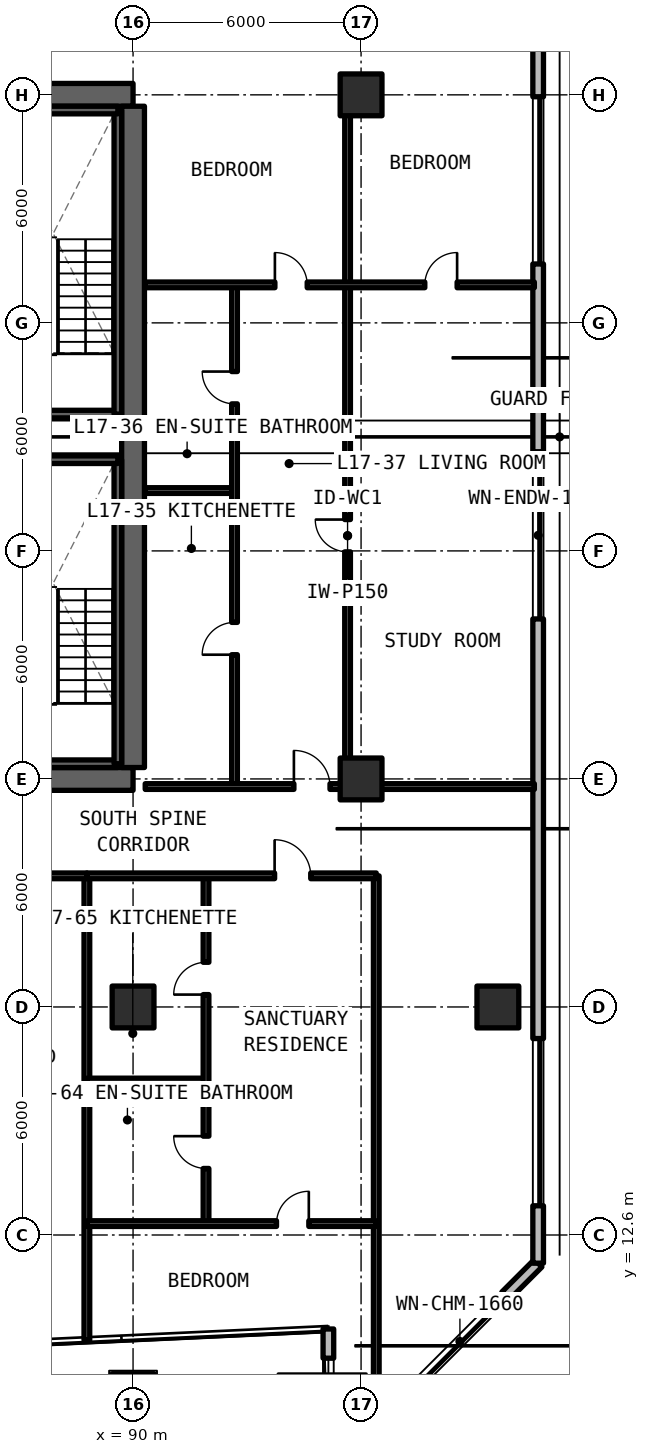
"""IFC4 building model, lengths in metres.
Left out: names, types, materials, properties, quantities, classifications, styles, units other than length and angle.
Written with IfcOpenShell. Run it as: python <this file> out.ifc"""

import sys

from ifc_helpers import new_model, si_unit, direction, frame, frame_2d, origin, origin_2d, place, context, subcontext, project, spatial, rectangle, extrude, element, fill, save


model = new_model("IFC4")
c1 = context("Model", 3, precision=1e-05, world=origin(), true_north=direction((0.0, 1.0)))
c2 = subcontext(c1, "Body", "Model", "MODEL_VIEW")
j1 = project(units=[si_unit("LENGTHUNIT", "METRE"), si_unit("PLANEANGLEUNIT", "RADIAN")], contexts=[c1])
p1 = place(None, origin())
s1 = spatial("IfcSite", under=j1, at=p1, CompositionType="ELEMENT")
p2 = place(p1, origin())
s2 = spatial("IfcBuilding", under=s1, at=p2, CompositionType="ELEMENT")
p3 = place(p2, frame((0.0, 0.0, 62.37)))
s3 = spatial("IfcBuildingStorey", under=s2, at=p3, CompositionType="ELEMENT", Elevation=62.37)
for number, where, z_axis, x_axis in (
    (1, (78.0, 24.6, 0.0), (0.0, 0.0, 1.0), (1.0, 0.0, 0.0)),
    (2, (90.0, 42.6, 0.0), (0.0, 0.0, 1.0), (-1.0, 0.0, 0.0)),
):
    element("IfcWall", number, at=place(p3, frame(where, z_axis=z_axis, x_axis=x_axis)), inside=s3, PredefinedType="SHEAR", context=c2, shape_type="SweptSolid", body=[
        extrude(rectangle(XDim=12.0, YDim=0.6, at=frame_2d((6.0, 0.0))), origin(), (0.0, 0.0, 1.0), 3.63),
    ])
p4 = place(p3, frame((90.0, 24.9, 0.0), z_axis=(0.0, 0.0, 1.0), x_axis=(0.0, 1.0, 0.0)))
e3 = element("IfcWall", 3, at=p4, inside=s3, PredefinedType="SHEAR", context=c2, shape_type="SweptSolid", body=[
    extrude(rectangle(XDim=17.4, YDim=0.6, at=frame_2d((8.7, 0.0))), origin(), (0.0, 0.0, 1.0), 3.63),
])
for number, where, z_axis, x_axis in (
    (4, (96.0, 24.6, 0.0), (0.0, 0.0, 1.0), (1.0, 0.0, 0.0)),
    (5, (96.0, 42.6, 0.0), (0.0, 0.0, 1.0), (1.0, 0.0, 0.0)),
    (6, (90.0, 18.6, 0.0), (0.0, 0.0, 1.0), (1.0, 0.0, 0.0)),
    (7, (99.6, 18.6, 0.0), (0.0, 0.0, 1.0), (1.0, 0.0, 0.0)),
    (8, (90.0, 8.4, 0.0), (0.0, 0.0, 1.0), (1.0, 0.0, 0.0)),
):
    element("IfcColumn", number, at=place(p3, frame(where, z_axis=z_axis, x_axis=x_axis)), inside=s3, PredefinedType="COLUMN", context=c2, shape_type="SweptSolid", body=[
        extrude(rectangle(XDim=1.1, YDim=1.1, at=origin_2d()), origin(), (0.0, 0.0, 1.0), 3.63),
    ])
p5 = place(p3, frame((95.14, 10.127, 0.0), z_axis=(0.0, 0.0, 1.0), x_axis=(0.0, -1.0, 0.0)))
e9 = element("IfcWall", 9, at=p5, inside=s3, PredefinedType="SOLIDWALL", context=c2, shape_type="SweptSolid", body=[
    extrude(rectangle(XDim=2.387, YDim=0.28, at=frame_2d((1.193, 0.0))), origin(), (0.0, 0.0, 1.0), 3.41),
])
p6 = place(p5, frame((0.768, 0.0, 0.78)))
e10 = element("IfcOpeningElement", 10, at=p6, cuts=e9, PredefinedType="OPENING", context=c2, shape_type="SweptSolid", body=[
    extrude(rectangle(XDim=0.85, YDim=1.65, at=frame_2d((0.425, 0.825))), frame((0.0, 0.15, 0.0), z_axis=(0.0, -1.0, 0.0), x_axis=(1.0, 0.0, 0.0)), (0.0, 0.0, 1.0), 0.3),
])
p7 = place(p3, frame((96.542, 7.74, 0.0), z_axis=(0.0, 0.0, 1.0), x_axis=(0.707106781187, 0.707106781187, 0.0)))
e11 = element("IfcWall", 11, at=p7, inside=s3, PredefinedType="SOLIDWALL", context=c2, shape_type="SweptSolid", body=[
    extrude(rectangle(XDim=5.824, YDim=0.28, at=frame_2d((2.912, 0.0))), origin(), (0.0, 0.0, 1.0), 3.41),
])
p8 = place(p7, frame((1.212, 0.0, 0.78)))
e12 = element("IfcOpeningElement", 12, at=p8, cuts=e11, PredefinedType="OPENING", context=c2, shape_type="SweptSolid", body=[
    extrude(rectangle(XDim=3.4, YDim=1.66, at=frame_2d((1.7, 0.83))), frame((0.0, 0.15, 0.0), z_axis=(0.0, -1.0, 0.0), x_axis=(1.0, 0.0, 0.0)), (0.0, 0.0, 1.0), 0.3),
])
p9 = place(p3, frame((100.66, 11.858, 0.0), z_axis=(0.0, 0.0, 1.0), x_axis=(0.0, 1.0, 0.0)))
e13 = element("IfcWall", 13, at=p9, inside=s3, PredefinedType="SOLIDWALL", context=c2, shape_type="SweptSolid", body=[
    extrude(rectangle(XDim=43.484, YDim=0.28, at=frame_2d((21.742, 0.0))), origin(), (0.0, 0.0, 1.0), 3.41),
])
p10 = place(p9, frame((16.952, 0.0, 0.78)))
e14 = element("IfcOpeningElement", 14, at=p10, cuts=e13, PredefinedType="OPENING", context=c2, shape_type="SweptSolid", body=[
    extrude(rectangle(XDim=4.4, YDim=1.66, at=frame_2d((2.2, 0.83))), frame((0.0, 0.15, 0.0), z_axis=(0.0, -1.0, 0.0), x_axis=(1.0, 0.0, 0.0)), (0.0, 0.0, 1.0), 0.3),
])
p11 = place(p9, frame((26.292, 0.0, 0.78)))
e15 = element("IfcOpeningElement", 15, at=p11, cuts=e13, PredefinedType="OPENING", context=c2, shape_type="SweptSolid", body=[
    extrude(rectangle(XDim=4.4, YDim=1.66, at=frame_2d((2.2, 0.83))), frame((0.0, 0.15, 0.0), z_axis=(0.0, -1.0, 0.0), x_axis=(1.0, 0.0, 0.0)), (0.0, 0.0, 1.0), 0.3),
])
p12 = place(p9, frame((1.511, 0.0, 0.78)))
e16 = element("IfcOpeningElement", 16, at=p12, cuts=e13, PredefinedType="OPENING", context=c2, shape_type="SweptSolid", body=[
    extrude(rectangle(XDim=4.4, YDim=1.66, at=frame_2d((2.2, 0.83))), frame((0.0, 0.15, 0.0), z_axis=(0.0, -1.0, 0.0), x_axis=(1.0, 0.0, 0.0)), (0.0, 0.0, 1.0), 0.3),
])
p13 = place(p3, frame((95.645, 24.4, 0.0), z_axis=(0.0, 0.0, 1.0), x_axis=(0.0, 1.0, 0.0)))
e17 = element("IfcWall", 17, at=p13, inside=s3, PredefinedType="PARTITIONING", context=c2, shape_type="SweptSolid", body=[
    extrude(rectangle(XDim=13.2, YDim=0.15, at=frame_2d((6.6, 0.0))), origin(), (0.0, 0.0, 1.0), 2.63),
])
p14 = place(p13, frame((6.175, 0.0, 0.0)))
e18 = element("IfcOpeningElement", 18, at=p14, cuts=e17, PredefinedType="OPENING", context=c2, shape_type="SweptSolid", body=[
    extrude(rectangle(XDim=0.85, YDim=2.1, at=frame_2d((0.425, 1.05))), frame((0.0, 0.085, 0.0), z_axis=(0.0, -1.0, 0.0), x_axis=(1.0, 0.0, 0.0)), (0.0, 0.0, 1.0), 0.17),
])
p15 = place(p3, frame((90.32, 32.188, 0.0), z_axis=(0.0, 0.0, 1.0), x_axis=(1.0, 0.0, 0.0)))
e19 = element("IfcWall", 19, at=p15, inside=s3, PredefinedType="PARTITIONING", context=c2, shape_type="SweptSolid", body=[
    extrude(rectangle(XDim=2.35, YDim=0.15, at=frame_2d((1.175, 0.0))), origin(), (0.0, 0.0, 1.0), 2.63),
])
p16 = place(p3, frame((92.67, 24.4, 0.0), z_axis=(0.0, 0.0, 1.0), x_axis=(0.0, 1.0, 0.0)))
e20 = element("IfcWall", 20, at=p16, inside=s3, PredefinedType="PARTITIONING", context=c2, shape_type="SweptSolid", body=[
    extrude(rectangle(XDim=13.2, YDim=0.15, at=frame_2d((6.6, 0.0))), origin(), (0.0, 0.0, 1.0), 2.63),
])
p17 = place(p16, frame((3.469, 0.0, 0.0)))
e21 = element("IfcOpeningElement", 21, at=p17, cuts=e20, PredefinedType="OPENING", context=c2, shape_type="SweptSolid", body=[
    extrude(rectangle(XDim=0.85, YDim=2.1, at=frame_2d((0.425, 1.05))), frame((0.0, 0.085, 0.0), z_axis=(0.0, -1.0, 0.0), x_axis=(1.0, 0.0, 0.0)), (0.0, 0.0, 1.0), 0.17),
])
p18 = place(p16, frame((10.069, 0.0, 0.0)))
e22 = element("IfcOpeningElement", 22, at=p18, cuts=e20, PredefinedType="OPENING", context=c2, shape_type="SweptSolid", body=[
    extrude(rectangle(XDim=0.85, YDim=2.1, at=frame_2d((0.425, 1.05))), frame((0.0, 0.085, 0.0), z_axis=(0.0, -1.0, 0.0), x_axis=(1.0, 0.0, 0.0)), (0.0, 0.0, 1.0), 0.17),
])
p19 = place(p3, frame((95.645, 37.6, 0.0), z_axis=(0.0, 0.0, 1.0), x_axis=(0.0, 1.0, 0.0)))
e23 = element("IfcWall", 23, at=p19, inside=s3, PredefinedType="PARTITIONING", context=c2, shape_type="SweptSolid", body=[
    extrude(rectangle(XDim=5.2, YDim=0.15, at=frame_2d((2.6, 0.0))), origin(), (0.0, 0.0, 1.0), 2.63),
])
p20 = place(p3, frame((90.32, 37.6, 0.0), z_axis=(0.0, 0.0, 1.0), x_axis=(1.0, 0.0, 0.0)))
e24 = element("IfcWall", 24, at=p20, inside=s3, PredefinedType="PARTITIONING", context=c2, shape_type="SweptSolid", body=[
    extrude(rectangle(XDim=10.24, YDim=0.15, at=frame_2d((5.12, 0.0))), origin(), (0.0, 0.0, 1.0), 2.63),
])
p21 = place(p20, frame((3.412, 0.0, 0.0)))
e25 = element("IfcOpeningElement", 25, at=p21, cuts=e24, PredefinedType="OPENING", context=c2, shape_type="SweptSolid", body=[
    extrude(rectangle(XDim=0.85, YDim=2.1, at=frame_2d((0.425, 1.05))), frame((0.0, 0.085, 0.0), z_axis=(0.0, -1.0, 0.0), x_axis=(1.0, 0.0, 0.0)), (0.0, 0.0, 1.0), 0.17),
])
p22 = place(p20, frame((7.357, 0.0, 0.0)))
e26 = element("IfcOpeningElement", 26, at=p22, cuts=e24, PredefinedType="OPENING", context=c2, shape_type="SweptSolid", body=[
    extrude(rectangle(XDim=0.85, YDim=2.1, at=frame_2d((0.425, 1.05))), frame((0.0, 0.085, 0.0), z_axis=(0.0, -1.0, 0.0), x_axis=(1.0, 0.0, 0.0)), (0.0, 0.0, 1.0), 0.17),
])
p23 = place(p3, frame((90.32, 24.4, 0.0), z_axis=(0.0, 0.0, 1.0), x_axis=(1.0, 0.0, 0.0)))
e27 = element("IfcWall", 27, at=p23, inside=s3, PredefinedType="SOLIDWALL", context=c2, shape_type="SweptSolid", body=[
    extrude(rectangle(XDim=10.24, YDim=0.15, at=frame_2d((5.12, 0.0))), origin(), (0.0, 0.0, 1.0), 2.625),
])
p24 = place(p23, frame((3.913, 0.0, 0.0)))
e28 = element("IfcOpeningElement", 28, at=p24, cuts=e27, PredefinedType="OPENING", context=c2, shape_type="SweptSolid", body=[
    extrude(rectangle(XDim=0.95, YDim=2.15, at=frame_2d((0.475, 1.075))), frame((0.0, 0.085, 0.0), z_axis=(0.0, -1.0, 0.0), x_axis=(1.0, 0.0, 0.0)), (0.0, 0.0, 1.0), 0.17),
])
p25 = place(p3, frame((96.4, 7.74, 0.0), z_axis=(0.0, 0.0, 1.0), x_axis=(0.0, 1.0, 0.0)))
e29 = element("IfcWall", 29, at=p25, inside=s3, PredefinedType="SOLIDWALL", context=c2, shape_type="SweptSolid", body=[
    extrude(rectangle(XDim=14.31, YDim=0.15, at=frame_2d((7.155, 0.0))), origin(), (0.0, 0.0, 1.0), 2.63),
])
p26 = place(p3, frame((88.785, 9.831, 0.0), z_axis=(0.0, 0.0, 1.0), x_axis=(0.0, 1.0, 0.0)))
e30 = element("IfcWall", 30, at=p26, inside=s3, PredefinedType="SOLIDWALL", context=c2, shape_type="SweptSolid", body=[
    extrude(rectangle(XDim=12.219, YDim=0.15, at=frame_2d((6.109, 0.0))), origin(), (0.0, 0.0, 1.0), 2.63),
])
p27 = place(p3, frame((81.452, 22.05, 0.0), z_axis=(0.0, 0.0, 1.0), x_axis=(1.0, 0.0, 0.0)))
e31 = element("IfcWall", 31, at=p27, inside=s3, PredefinedType="SOLIDWALL", context=c2, shape_type="SweptSolid", body=[
    extrude(rectangle(XDim=7.333, YDim=0.15, at=frame_2d((3.667, 0.0))), origin(), (0.0, 0.0, 1.0), 2.63),
])
p28 = place(p27, frame((4.406, 0.0, 0.0)))
e32 = element("IfcOpeningElement", 32, at=p28, cuts=e31, PredefinedType="OPENING", context=c2, shape_type="SweptSolid", body=[
    extrude(rectangle(XDim=0.95, YDim=2.15, at=frame_2d((0.475, 1.075))), frame((0.0, 0.085, 0.0), z_axis=(0.0, -1.0, 0.0), x_axis=(1.0, 0.0, 0.0)), (0.0, 0.0, 1.0), 0.17),
])
p29 = place(p3, frame((88.785, 16.652, 0.0), z_axis=(0.0, 0.0, 1.0), x_axis=(1.0, 0.0, 0.0)))
e33 = element("IfcWall", 33, at=p29, inside=s3, PredefinedType="PARTITIONING", context=c2, shape_type="SweptSolid", body=[
    extrude(rectangle(XDim=3.135, YDim=0.15, at=frame_2d((1.567, 0.0))), origin(), (0.0, 0.0, 1.0), 2.63),
])
p30 = place(p3, frame((91.92, 12.9, 0.0), z_axis=(0.0, 0.0, 1.0), x_axis=(0.0, 1.0, 0.0)))
e34 = element("IfcWall", 34, at=p30, inside=s3, PredefinedType="PARTITIONING", context=c2, shape_type="SweptSolid", body=[
    extrude(rectangle(XDim=9.15, YDim=0.15, at=frame_2d((4.575, 0.0))), origin(), (0.0, 0.0, 1.0), 2.63),
])
p31 = place(p30, frame((1.451, 0.0, 0.0)))
e35 = element("IfcOpeningElement", 35, at=p31, cuts=e34, PredefinedType="OPENING", context=c2, shape_type="SweptSolid", body=[
    extrude(rectangle(XDim=0.85, YDim=2.1, at=frame_2d((0.425, 1.05))), frame((0.0, 0.085, 0.0), z_axis=(0.0, -1.0, 0.0), x_axis=(1.0, 0.0, 0.0)), (0.0, 0.0, 1.0), 0.17),
])
p32 = place(p30, frame((6.026, 0.0, 0.0)))
e36 = element("IfcOpeningElement", 36, at=p32, cuts=e34, PredefinedType="OPENING", context=c2, shape_type="SweptSolid", body=[
    extrude(rectangle(XDim=0.85, YDim=2.1, at=frame_2d((0.425, 1.05))), frame((0.0, 0.085, 0.0), z_axis=(0.0, -1.0, 0.0), x_axis=(1.0, 0.0, 0.0)), (0.0, 0.0, 1.0), 0.17),
])
p33 = place(p3, frame((88.785, 12.9, 0.0), z_axis=(0.0, 0.0, 1.0), x_axis=(1.0, 0.0, 0.0)))
e37 = element("IfcWall", 37, at=p33, inside=s3, PredefinedType="PARTITIONING", context=c2, shape_type="SweptSolid", body=[
    extrude(rectangle(XDim=7.615, YDim=0.15, at=frame_2d((3.808, 0.0))), origin(), (0.0, 0.0, 1.0), 2.63),
])
p34 = place(p33, frame((4.99, 0.0, 0.0)))
e38 = element("IfcOpeningElement", 38, at=p34, cuts=e37, PredefinedType="OPENING", context=c2, shape_type="SweptSolid", body=[
    extrude(rectangle(XDim=0.85, YDim=2.1, at=frame_2d((0.425, 1.05))), frame((0.0, 0.085, 0.0), z_axis=(0.0, -1.0, 0.0), x_axis=(1.0, 0.0, 0.0)), (0.0, 0.0, 1.0), 0.17),
])
p35 = place(p3, frame((88.785, 22.05, 0.0), z_axis=(0.0, 0.0, 1.0), x_axis=(1.0, 0.0, 0.0)))
e39 = element("IfcWall", 39, at=p35, inside=s3, PredefinedType="SOLIDWALL", context=c2, shape_type="SweptSolid", body=[
    extrude(rectangle(XDim=7.615, YDim=0.15, at=frame_2d((3.808, 0.0))), origin(), (0.0, 0.0, 1.0), 2.63),
])
p36 = place(p35, frame((4.94, 0.0, 0.0)))
e40 = element("IfcOpeningElement", 40, at=p36, cuts=e39, PredefinedType="OPENING", context=c2, shape_type="SweptSolid", body=[
    extrude(rectangle(XDim=0.95, YDim=2.15, at=frame_2d((0.475, 1.075))), frame((0.0, 0.085, 0.0), z_axis=(0.0, -1.0, 0.0), x_axis=(1.0, 0.0, 0.0)), (0.0, 0.0, 1.0), 0.17),
])
p37 = place(p3, frame((86.2, 25.0, 0.0), z_axis=(0.0, 0.0, 1.0), x_axis=(1.0, 0.0, 0.0)))
e41 = element("IfcWall", 41, at=p37, inside=s3, PredefinedType="SOLIDWALL", context=c2, shape_type="SweptSolid", body=[
    extrude(rectangle(XDim=3.4, YDim=0.2, at=frame_2d((1.7, 0.0))), origin(), (0.0, 0.0, 1.0), 3.63),
])
p38 = place(p3, frame((89.6, 25.0, 0.0), z_axis=(0.0, 0.0, 1.0), x_axis=(0.0, 1.0, 0.0)))
e42 = element("IfcWall", 42, at=p38, inside=s3, PredefinedType="SOLIDWALL", context=c2, shape_type="SweptSolid", body=[
    extrude(rectangle(XDim=8.0, YDim=0.2, at=frame_2d((4.0, 0.0))), origin(), (0.0, 0.0, 1.0), 3.63),
])
for number, where, z_axis, x_axis in (
    (43, (89.6, 33.0, 0.0), (0.0, 0.0, 1.0), (-1.0, 0.0, 0.0)),
    (44, (86.2, 34.2, 0.0), (0.0, 0.0, 1.0), (1.0, 0.0, 0.0)),
):
    element("IfcWall", number, at=place(p3, frame(where, z_axis=z_axis, x_axis=x_axis)), inside=s3, PredefinedType="SOLIDWALL", context=c2, shape_type="SweptSolid", body=[
        extrude(rectangle(XDim=3.4, YDim=0.2, at=frame_2d((1.7, 0.0))), origin(), (0.0, 0.0, 1.0), 3.63),
    ])
p39 = place(p3, frame((89.6, 34.2, 0.0), z_axis=(0.0, 0.0, 1.0), x_axis=(0.0, 1.0, 0.0)))
e45 = element("IfcWall", 45, at=p39, inside=s3, PredefinedType="SOLIDWALL", context=c2, shape_type="SweptSolid", body=[
    extrude(rectangle(XDim=8.0, YDim=0.2, at=frame_2d((4.0, 0.0))), origin(), (0.0, 0.0, 1.0), 3.63),
])
p40 = place(p3, frame((89.6, 42.2, 0.0), z_axis=(0.0, 0.0, 1.0), x_axis=(-1.0, 0.0, 0.0)))
e46 = element("IfcWall", 46, at=p40, inside=s3, PredefinedType="SOLIDWALL", context=c2, shape_type="SweptSolid", body=[
    extrude(rectangle(XDim=3.4, YDim=0.2, at=frame_2d((1.7, 0.0))), origin(), (0.0, 0.0, 1.0), 3.63),
])
p41 = place(p6, origin())
e47 = element("IfcWindow", 47, at=p41, inside=s3, PartitioningType="SINGLE_PANEL", PredefinedType="WINDOW", context=c2, shape_type="SweptSolid", body=[
    extrude(rectangle(XDim=0.85, YDim=1.65, at=frame_2d((0.425, 0.825))), frame((0.0, 0.03, 0.0), z_axis=(0.0, -1.0, 0.0), x_axis=(1.0, 0.0, 0.0)), (0.0, 0.0, 1.0), 0.06),
])
fill(e10, e47)
p42 = place(p8, origin())
e48 = element("IfcWindow", 48, at=p42, inside=s3, PartitioningType="SINGLE_PANEL", PredefinedType="WINDOW", context=c2, shape_type="SweptSolid", body=[
    extrude(rectangle(XDim=3.4, YDim=1.66, at=frame_2d((1.7, 0.83))), frame((0.0, 0.03, 0.0), z_axis=(0.0, -1.0, 0.0), x_axis=(1.0, 0.0, 0.0)), (0.0, 0.0, 1.0), 0.06),
])
fill(e12, e48)
p43 = place(p10, origin())
e49 = element("IfcWindow", 49, at=p43, inside=s3, PartitioningType="SINGLE_PANEL", PredefinedType="WINDOW", context=c2, shape_type="SweptSolid", body=[
    extrude(rectangle(XDim=4.4, YDim=1.66, at=frame_2d((2.2, 0.83))), frame((0.0, 0.03, 0.0), z_axis=(0.0, -1.0, 0.0), x_axis=(1.0, 0.0, 0.0)), (0.0, 0.0, 1.0), 0.06),
])
fill(e14, e49)
p44 = place(p11, origin())
e50 = element("IfcWindow", 50, at=p44, inside=s3, PartitioningType="SINGLE_PANEL", PredefinedType="WINDOW", context=c2, shape_type="SweptSolid", body=[
    extrude(rectangle(XDim=4.4, YDim=1.66, at=frame_2d((2.2, 0.83))), frame((0.0, 0.03, 0.0), z_axis=(0.0, -1.0, 0.0), x_axis=(1.0, 0.0, 0.0)), (0.0, 0.0, 1.0), 0.06),
])
fill(e15, e50)
p45 = place(p12, origin())
e51 = element("IfcWindow", 51, at=p45, inside=s3, PartitioningType="SINGLE_PANEL", PredefinedType="WINDOW", context=c2, shape_type="SweptSolid", body=[
    extrude(rectangle(XDim=4.4, YDim=1.66, at=frame_2d((2.2, 0.83))), frame((0.0, 0.03, 0.0), z_axis=(0.0, -1.0, 0.0), x_axis=(1.0, 0.0, 0.0)), (0.0, 0.0, 1.0), 0.06),
])
fill(e16, e51)
p46 = place(p14, origin())
e52 = element("IfcDoor", 52, at=p46, inside=s3, OperationType="SINGLE_SWING_RIGHT", PredefinedType="DOOR", context=c2, shape_type="SweptSolid", body=[
    extrude(rectangle(XDim=0.85, YDim=2.1, at=frame_2d((0.425, 1.05))), frame((0.0, 0.025, 0.0), z_axis=(0.0, -1.0, 0.0), x_axis=(1.0, 0.0, 0.0)), (0.0, 0.0, 1.0), 0.05),
])
fill(e18, e52)
p47 = place(p17, origin())
e53 = element("IfcDoor", 53, at=p47, inside=s3, OperationType="SINGLE_SWING_LEFT", PredefinedType="DOOR", context=c2, shape_type="SweptSolid", body=[
    extrude(rectangle(XDim=0.85, YDim=2.1, at=frame_2d((0.425, 1.05))), frame((0.0, 0.025, 0.0), z_axis=(0.0, -1.0, 0.0), x_axis=(1.0, 0.0, 0.0)), (0.0, 0.0, 1.0), 0.05),
])
fill(e21, e53)
p48 = place(p18, origin())
e54 = element("IfcDoor", 54, at=p48, inside=s3, OperationType="SINGLE_SWING_RIGHT", PredefinedType="DOOR", context=c2, shape_type="SweptSolid", body=[
    extrude(rectangle(XDim=0.85, YDim=2.1, at=frame_2d((0.425, 1.05))), frame((0.0, 0.025, 0.0), z_axis=(0.0, -1.0, 0.0), x_axis=(1.0, 0.0, 0.0)), (0.0, 0.0, 1.0), 0.05),
])
fill(e22, e54)
p49 = place(p21, origin())
e55 = element("IfcDoor", 55, at=p49, inside=s3, OperationType="SINGLE_SWING_LEFT", PredefinedType="DOOR", context=c2, shape_type="SweptSolid", body=[
    extrude(rectangle(XDim=0.85, YDim=2.1, at=frame_2d((0.425, 1.05))), frame((0.0, 0.025, 0.0), z_axis=(0.0, -1.0, 0.0), x_axis=(1.0, 0.0, 0.0)), (0.0, 0.0, 1.0), 0.05),
])
fill(e25, e55)
p50 = place(p22, origin())
e56 = element("IfcDoor", 56, at=p50, inside=s3, OperationType="SINGLE_SWING_RIGHT", PredefinedType="DOOR", context=c2, shape_type="SweptSolid", body=[
    extrude(rectangle(XDim=0.85, YDim=2.1, at=frame_2d((0.425, 1.05))), frame((0.0, 0.025, 0.0), z_axis=(0.0, -1.0, 0.0), x_axis=(1.0, 0.0, 0.0)), (0.0, 0.0, 1.0), 0.05),
])
fill(e26, e56)
p51 = place(p24, origin())
e57 = element("IfcDoor", 57, at=p51, inside=s3, OperationType="SINGLE_SWING_LEFT", PredefinedType="DOOR", context=c2, shape_type="SweptSolid", body=[
    extrude(rectangle(XDim=0.95, YDim=2.15, at=frame_2d((0.475, 1.075))), frame((0.0, 0.025, 0.0), z_axis=(0.0, -1.0, 0.0), x_axis=(1.0, 0.0, 0.0)), (0.0, 0.0, 1.0), 0.05),
])
fill(e28, e57)
p52 = place(p31, origin())
e58 = element("IfcDoor", 58, at=p52, inside=s3, OperationType="SINGLE_SWING_RIGHT", PredefinedType="DOOR", context=c2, shape_type="SweptSolid", body=[
    extrude(rectangle(XDim=0.85, YDim=2.1, at=frame_2d((0.425, 1.05))), frame((0.0, 0.025, 0.0), z_axis=(0.0, -1.0, 0.0), x_axis=(1.0, 0.0, 0.0)), (0.0, 0.0, 1.0), 0.05),
])
fill(e35, e58)
p53 = place(p32, origin())
e59 = element("IfcDoor", 59, at=p53, inside=s3, OperationType="SINGLE_SWING_LEFT", PredefinedType="DOOR", context=c2, shape_type="SweptSolid", body=[
    extrude(rectangle(XDim=0.85, YDim=2.1, at=frame_2d((0.425, 1.05))), frame((0.0, 0.025, 0.0), z_axis=(0.0, -1.0, 0.0), x_axis=(1.0, 0.0, 0.0)), (0.0, 0.0, 1.0), 0.05),
])
fill(e36, e59)
p54 = place(p34, origin())
e60 = element("IfcDoor", 60, at=p54, inside=s3, OperationType="SINGLE_SWING_RIGHT", PredefinedType="DOOR", context=c2, shape_type="SweptSolid", body=[
    extrude(rectangle(XDim=0.85, YDim=2.1, at=frame_2d((0.425, 1.05))), frame((0.0, 0.025, 0.0), z_axis=(0.0, -1.0, 0.0), x_axis=(1.0, 0.0, 0.0)), (0.0, 0.0, 1.0), 0.05),
])
fill(e38, e60)
p55 = place(p36, origin())
e61 = element("IfcDoor", 61, at=p55, inside=s3, OperationType="SINGLE_SWING_LEFT", PredefinedType="DOOR", context=c2, shape_type="SweptSolid", body=[
    extrude(rectangle(XDim=0.95, YDim=2.15, at=frame_2d((0.475, 1.075))), frame((0.0, 0.025, 0.0), z_axis=(0.0, -1.0, 0.0), x_axis=(1.0, 0.0, 0.0)), (0.0, 0.0, 1.0), 0.05),
])
fill(e40, e61)
save(model, sys.argv[1])
